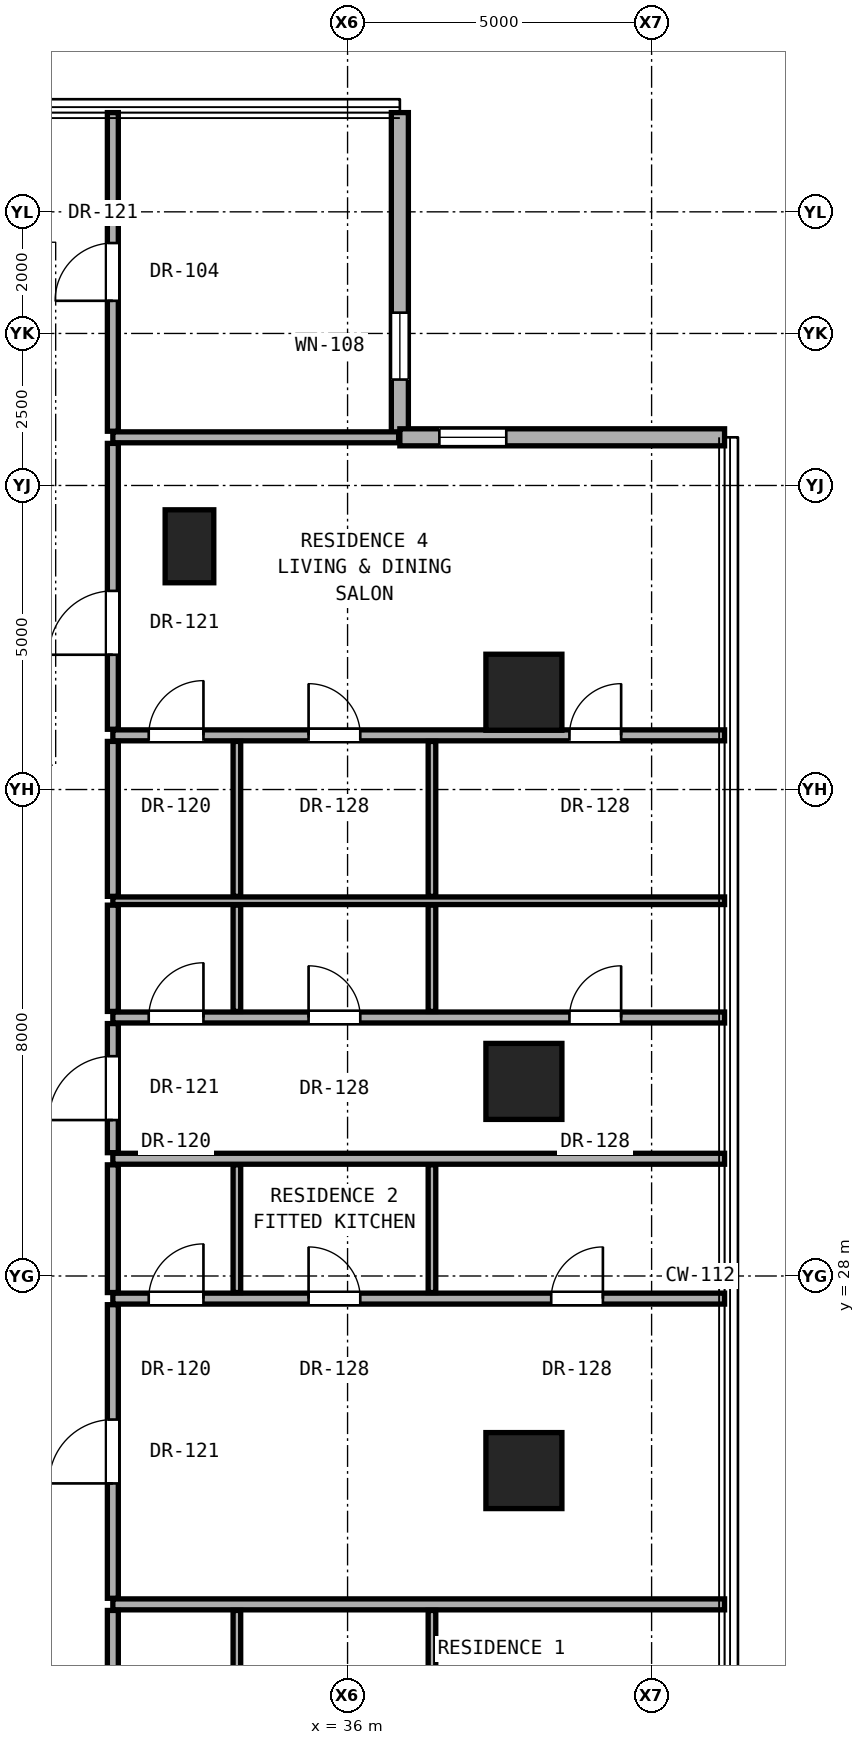
"""IFC4 building model, lengths in metres.
Left out: names, types, materials, properties, quantities, classifications, styles, units other than length and angle.
Written with IfcOpenShell. Run it as: python <this file> out.ifc"""

import sys

from ifc_helpers import new_model, si_unit, direction, frame, frame_2d, origin, origin_2d, place, context, subcontext, project, spatial, rectangle, hollow_rectangle, extrude, element, fill, save


model = new_model("IFC4")
c1 = context("Model", 3, precision=1e-05, world=origin(), true_north=direction((0.0, 1.0)))
c2 = subcontext(c1, "Body", "Model", "MODEL_VIEW")
j1 = project(units=[si_unit("LENGTHUNIT", "METRE"), si_unit("PLANEANGLEUNIT", "RADIAN")], contexts=[c1])
p1 = place(None, origin())
s1 = spatial("IfcSite", under=j1, at=p1, CompositionType="ELEMENT")
p2 = place(p1, origin())
s2 = spatial("IfcBuilding", under=s1, at=p2, CompositionType="ELEMENT")
p3 = place(p2, frame((0.0, 0.0, 65.3)))
s3 = spatial("IfcBuildingStorey", under=s2, at=p3, CompositionType="ELEMENT", Elevation=65.3)
for number, where, z_axis, x_axis in (
    (1, (38.9, 24.8, 0.0), (0.0, 0.0, 1.0), (1.0, 0.0, 0.0)),
    (2, (38.9, 31.2, 0.0), (0.0, 0.0, 1.0), (1.0, 0.0, 0.0)),
    (3, (38.9, 37.6, 0.0), (0.0, 0.0, 1.0), (1.0, 0.0, 0.0)),
):
    element("IfcColumn", number, at=place(p3, frame(where, z_axis=z_axis, x_axis=x_axis)), inside=s3, PredefinedType="COLUMN", context=c2, shape_type="SweptSolid", body=[
        extrude(hollow_rectangle(XDim=1.25, YDim=1.25, WallThickness=0.07, at=origin_2d()), origin(), (0.0, 0.0, 1.0), 3.3),
    ])
p4 = place(p3, frame((33.4, 40.0, 0.0), z_axis=(0.0, 0.0, 1.0), x_axis=(1.0, 0.0, 0.0)))
e4 = element("IfcColumn", 4, at=p4, inside=s3, PredefinedType="PILASTER", context=c2, shape_type="SweptSolid", body=[
    extrude(rectangle(XDim=0.8, YDim=1.2, at=origin_2d()), origin(), (0.0, 0.0, 1.0), 3.3),
])
p5 = place(p3, frame((36.86, 41.792, 0.0), z_axis=(0.0, 0.0, 1.0), x_axis=(0.0, 1.0, 0.0)))
e5 = element("IfcWall", 5, at=p5, inside=s3, PredefinedType="SOLIDWALL", context=c2, shape_type="SweptSolid", body=[
    extrude(rectangle(XDim=5.34, YDim=0.28, at=frame_2d((2.67, 0.0))), origin(), (0.0, 0.0, 1.0), 3.04),
])
p6 = place(p5, frame((0.95, 0.0, 0.85)))
e6 = element("IfcOpeningElement", 6, at=p6, cuts=e5, PredefinedType="OPENING", context=c2, shape_type="SweptSolid", body=[
    extrude(rectangle(XDim=1.1, YDim=2.0, at=frame_2d((0.55, 1.0))), frame((0.0, 0.15, 0.0), z_axis=(0.0, -1.0, 0.0), x_axis=(1.0, 0.0, 0.0)), (0.0, 0.0, 1.0), 0.3),
])
p7 = place(p3, frame((42.2, 41.792, 0.0), z_axis=(0.0, 0.0, 1.0), x_axis=(-1.0, 0.0, 0.0)))
e7 = element("IfcWall", 7, at=p7, inside=s3, PredefinedType="SOLIDWALL", context=c2, shape_type="SweptSolid", body=[
    extrude(rectangle(XDim=5.34, YDim=0.28, at=frame_2d((2.67, 0.0))), origin(), (0.0, 0.0, 1.0), 3.04),
])
p8 = place(p7, frame((3.59, 0.0, 0.85)))
e8 = element("IfcOpeningElement", 8, at=p8, cuts=e7, PredefinedType="OPENING", context=c2, shape_type="SweptSolid", body=[
    extrude(rectangle(XDim=1.1, YDim=2.0, at=frame_2d((0.55, 1.0))), frame((0.0, 0.15, 0.0), z_axis=(0.0, -1.0, 0.0), x_axis=(1.0, 0.0, 0.0)), (0.0, 0.0, 1.0), 0.3),
])
p9 = place(p3, frame((32.14, 22.6, 0.0), z_axis=(0.0, 0.0, 1.0), x_axis=(1.0, 0.0, 0.0)))
e9 = element("IfcWall", 9, at=p9, inside=s3, PredefinedType="PARTITIONING", context=c2, shape_type="SweptSolid", body=[
    extrude(rectangle(XDim=10.06, YDim=0.18, at=frame_2d((5.03, 0.0))), origin(), (0.0, 0.0, 1.0), 2.125),
])
p10 = place(p3, frame((32.14, 27.628, 0.0), z_axis=(0.0, 0.0, 1.0), x_axis=(1.0, 0.0, 0.0)))
e10 = element("IfcWall", 10, at=p10, inside=s3, PredefinedType="PARTITIONING", context=c2, shape_type="SweptSolid", body=[
    extrude(rectangle(XDim=10.06, YDim=0.18, at=frame_2d((5.03, 0.0))), origin(), (0.0, 0.0, 1.0), 2.125),
])
p11 = place(p10, frame((7.209, 0.0, 0.0)))
e11 = element("IfcOpeningElement", 11, at=p11, cuts=e10, PredefinedType="OPENING", context=c2, shape_type="SweptSolid", body=[
    extrude(rectangle(XDim=0.85, YDim=2.01, at=frame_2d((0.425, 1.005))), frame((0.0, 0.1, 0.0), z_axis=(0.0, -1.0, 0.0), x_axis=(1.0, 0.0, 0.0)), (0.0, 0.0, 1.0), 0.2),
])
p12 = place(p10, frame((3.219, 0.0, 0.0)))
e12 = element("IfcOpeningElement", 12, at=p12, cuts=e10, PredefinedType="OPENING", context=c2, shape_type="SweptSolid", body=[
    extrude(rectangle(XDim=0.85, YDim=2.01, at=frame_2d((0.425, 1.005))), frame((0.0, 0.1, 0.0), z_axis=(0.0, -1.0, 0.0), x_axis=(1.0, 0.0, 0.0)), (0.0, 0.0, 1.0), 0.2),
])
p13 = place(p10, frame((0.59, 0.0, 0.0)))
e13 = element("IfcOpeningElement", 13, at=p13, cuts=e10, PredefinedType="OPENING", context=c2, shape_type="SweptSolid", body=[
    extrude(rectangle(XDim=0.9, YDim=2.1, at=frame_2d((0.45, 1.05))), frame((0.0, 0.1, 0.0), z_axis=(0.0, -1.0, 0.0), x_axis=(1.0, 0.0, 0.0)), (0.0, 0.0, 1.0), 0.2),
])
p14 = place(p3, frame((32.14, 29.928, 0.0), z_axis=(0.0, 0.0, 1.0), x_axis=(1.0, 0.0, 0.0)))
e14 = element("IfcWall", 14, at=p14, inside=s3, PredefinedType="PARTITIONING", context=c2, shape_type="SweptSolid", body=[
    extrude(rectangle(XDim=10.06, YDim=0.18, at=frame_2d((5.03, 0.0))), origin(), (0.0, 0.0, 1.0), 2.125),
])
p15 = place(p3, frame((32.14, 32.251, 0.0), z_axis=(0.0, 0.0, 1.0), x_axis=(1.0, 0.0, 0.0)))
e15 = element("IfcWall", 15, at=p15, inside=s3, PredefinedType="PARTITIONING", context=c2, shape_type="SweptSolid", body=[
    extrude(rectangle(XDim=10.06, YDim=0.18, at=frame_2d((5.03, 0.0))), origin(), (0.0, 0.0, 1.0), 2.125),
])
p16 = place(p15, frame((7.509, 0.0, 0.0)))
e16 = element("IfcOpeningElement", 16, at=p16, cuts=e15, PredefinedType="OPENING", context=c2, shape_type="SweptSolid", body=[
    extrude(rectangle(XDim=0.85, YDim=2.01, at=frame_2d((0.425, 1.005))), frame((0.0, 0.1, 0.0), z_axis=(0.0, -1.0, 0.0), x_axis=(1.0, 0.0, 0.0)), (0.0, 0.0, 1.0), 0.2),
])
p17 = place(p15, frame((3.219, 0.0, 0.0)))
e17 = element("IfcOpeningElement", 17, at=p17, cuts=e15, PredefinedType="OPENING", context=c2, shape_type="SweptSolid", body=[
    extrude(rectangle(XDim=0.85, YDim=2.01, at=frame_2d((0.425, 1.005))), frame((0.0, 0.1, 0.0), z_axis=(0.0, -1.0, 0.0), x_axis=(1.0, 0.0, 0.0)), (0.0, 0.0, 1.0), 0.2),
])
p18 = place(p15, frame((0.59, 0.0, 0.0)))
e18 = element("IfcOpeningElement", 18, at=p18, cuts=e15, PredefinedType="OPENING", context=c2, shape_type="SweptSolid", body=[
    extrude(rectangle(XDim=0.9, YDim=2.1, at=frame_2d((0.45, 1.05))), frame((0.0, 0.1, 0.0), z_axis=(0.0, -1.0, 0.0), x_axis=(1.0, 0.0, 0.0)), (0.0, 0.0, 1.0), 0.2),
])
p19 = place(p3, frame((32.14, 34.171, 0.0), z_axis=(0.0, 0.0, 1.0), x_axis=(1.0, 0.0, 0.0)))
e19 = element("IfcWall", 19, at=p19, inside=s3, PredefinedType="PARTITIONING", context=c2, shape_type="SweptSolid", body=[
    extrude(rectangle(XDim=10.06, YDim=0.125, at=frame_2d((5.03, 0.0))), origin(), (0.0, 0.0, 1.0), 2.125),
])
p20 = place(p3, frame((32.14, 36.891, 0.0), z_axis=(0.0, 0.0, 1.0), x_axis=(1.0, 0.0, 0.0)))
e20 = element("IfcWall", 20, at=p20, inside=s3, PredefinedType="PARTITIONING", context=c2, shape_type="SweptSolid", body=[
    extrude(rectangle(XDim=10.06, YDim=0.18, at=frame_2d((5.03, 0.0))), origin(), (0.0, 0.0, 1.0), 2.125),
])
p21 = place(p20, frame((7.509, 0.0, 0.0)))
e21 = element("IfcOpeningElement", 21, at=p21, cuts=e20, PredefinedType="OPENING", context=c2, shape_type="SweptSolid", body=[
    extrude(rectangle(XDim=0.85, YDim=2.01, at=frame_2d((0.425, 1.005))), frame((0.0, 0.1, 0.0), z_axis=(0.0, -1.0, 0.0), x_axis=(1.0, 0.0, 0.0)), (0.0, 0.0, 1.0), 0.2),
])
p22 = place(p20, frame((3.219, 0.0, 0.0)))
e22 = element("IfcOpeningElement", 22, at=p22, cuts=e20, PredefinedType="OPENING", context=c2, shape_type="SweptSolid", body=[
    extrude(rectangle(XDim=0.85, YDim=2.01, at=frame_2d((0.425, 1.005))), frame((0.0, 0.1, 0.0), z_axis=(0.0, -1.0, 0.0), x_axis=(1.0, 0.0, 0.0)), (0.0, 0.0, 1.0), 0.2),
])
p23 = place(p20, frame((0.59, 0.0, 0.0)))
e23 = element("IfcOpeningElement", 23, at=p23, cuts=e20, PredefinedType="OPENING", context=c2, shape_type="SweptSolid", body=[
    extrude(rectangle(XDim=0.9, YDim=2.1, at=frame_2d((0.45, 1.05))), frame((0.0, 0.1, 0.0), z_axis=(0.0, -1.0, 0.0), x_axis=(1.0, 0.0, 0.0)), (0.0, 0.0, 1.0), 0.2),
])
p24 = place(p3, frame((32.14, 41.792, 0.0), z_axis=(0.0, 0.0, 1.0), x_axis=(1.0, 0.0, 0.0)))
e24 = element("IfcWall", 24, at=p24, inside=s3, PredefinedType="PARTITIONING", context=c2, shape_type="SweptSolid", body=[
    extrude(rectangle(XDim=4.7, YDim=0.18, at=frame_2d((2.35, 0.0))), origin(), (0.0, 0.0, 1.0), 3.06),
])
p25 = place(p3, frame((32.14, 19.98, 0.0), z_axis=(0.0, 0.0, 1.0), x_axis=(0.0, 1.0, 0.0)))
e25 = element("IfcWall", 25, at=p25, inside=s3, PredefinedType="PARTITIONING", context=c2, shape_type="SweptSolid", body=[
    extrude(rectangle(XDim=2.52, YDim=0.18, at=frame_2d((1.26, 0.0))), origin(), (0.0, 0.0, 1.0), 3.06),
])
p26 = place(p3, frame((32.14, 22.7, 0.0), z_axis=(0.0, 0.0, 1.0), x_axis=(0.0, 1.0, 0.0)))
e26 = element("IfcWall", 26, at=p26, inside=s3, PredefinedType="PARTITIONING", context=c2, shape_type="SweptSolid", body=[
    extrude(rectangle(XDim=4.828, YDim=0.18, at=frame_2d((2.414, 0.0))), origin(), (0.0, 0.0, 1.0), 2.279),
])
p27 = place(p26, frame((1.889, 0.0, 0.0)))
e27 = element("IfcOpeningElement", 27, at=p27, cuts=e26, PredefinedType="OPENING", context=c2, shape_type="SweptSolid", body=[
    extrude(rectangle(XDim=1.05, YDim=2.2, at=frame_2d((0.525, 1.1))), frame((0.0, 0.1, 0.0), z_axis=(0.0, -1.0, 0.0), x_axis=(1.0, 0.0, 0.0)), (0.0, 0.0, 1.0), 0.2),
])
p28 = place(p3, frame((32.14, 27.728, 0.0), z_axis=(0.0, 0.0, 1.0), x_axis=(0.0, 1.0, 0.0)))
e28 = element("IfcWall", 28, at=p28, inside=s3, PredefinedType="PARTITIONING", context=c2, shape_type="SweptSolid", body=[
    extrude(rectangle(XDim=2.1, YDim=0.18, at=frame_2d((1.05, 0.0))), origin(), (0.0, 0.0, 1.0), 3.06),
])
p29 = place(p3, frame((32.14, 30.028, 0.0), z_axis=(0.0, 0.0, 1.0), x_axis=(0.0, 1.0, 0.0)))
e29 = element("IfcWall", 29, at=p29, inside=s3, PredefinedType="PARTITIONING", context=c2, shape_type="SweptSolid", body=[
    extrude(rectangle(XDim=2.123, YDim=0.18, at=frame_2d((1.062, 0.0))), origin(), (0.0, 0.0, 1.0), 2.279),
])
p30 = place(p29, frame((0.537, 0.0, 0.0)))
e30 = element("IfcOpeningElement", 30, at=p30, cuts=e29, PredefinedType="OPENING", context=c2, shape_type="SweptSolid", body=[
    extrude(rectangle(XDim=1.05, YDim=2.2, at=frame_2d((0.525, 1.1))), frame((0.0, 0.1, 0.0), z_axis=(0.0, -1.0, 0.0), x_axis=(1.0, 0.0, 0.0)), (0.0, 0.0, 1.0), 0.2),
])
p31 = place(p3, frame((32.14, 32.351, 0.0), z_axis=(0.0, 0.0, 1.0), x_axis=(0.0, 1.0, 0.0)))
e31 = element("IfcWall", 31, at=p31, inside=s3, PredefinedType="PARTITIONING", context=c2, shape_type="SweptSolid", body=[
    extrude(rectangle(XDim=1.747, YDim=0.18, at=frame_2d((0.874, 0.0))), origin(), (0.0, 0.0, 1.0), 3.06),
])
p32 = place(p3, frame((32.14, 34.243, 0.0), z_axis=(0.0, 0.0, 1.0), x_axis=(0.0, 1.0, 0.0)))
e32 = element("IfcWall", 32, at=p32, inside=s3, PredefinedType="PARTITIONING", context=c2, shape_type="SweptSolid", body=[
    extrude(rectangle(XDim=2.548, YDim=0.18, at=frame_2d((1.274, 0.0))), origin(), (0.0, 0.0, 1.0), 3.06),
])
p33 = place(p3, frame((32.14, 36.991, 0.0), z_axis=(0.0, 0.0, 1.0), x_axis=(0.0, 1.0, 0.0)))
e33 = element("IfcWall", 33, at=p33, inside=s3, PredefinedType="PARTITIONING", context=c2, shape_type="SweptSolid", body=[
    extrude(rectangle(XDim=4.701, YDim=0.18, at=frame_2d((2.351, 0.0))), origin(), (0.0, 0.0, 1.0), 2.436),
])
p34 = place(p33, frame((1.226, 0.0, 0.0)))
e34 = element("IfcOpeningElement", 34, at=p34, cuts=e33, PredefinedType="OPENING", context=c2, shape_type="SweptSolid", body=[
    extrude(rectangle(XDim=1.05, YDim=2.2, at=frame_2d((0.525, 1.1))), frame((0.0, 0.1, 0.0), z_axis=(0.0, -1.0, 0.0), x_axis=(1.0, 0.0, 0.0)), (0.0, 0.0, 1.0), 0.2),
])
p35 = place(p3, frame((32.14, 41.892, 0.0), z_axis=(0.0, 0.0, 1.0), x_axis=(0.0, 1.0, 0.0)))
e35 = element("IfcWall", 35, at=p35, inside=s3, PredefinedType="PARTITIONING", context=c2, shape_type="SweptSolid", body=[
    extrude(rectangle(XDim=5.24, YDim=0.18, at=frame_2d((2.62, 0.0))), origin(), (0.0, 0.0, 1.0), 3.06),
])
p36 = place(p35, frame((2.145, 0.0, 0.0)))
e36 = element("IfcOpeningElement", 36, at=p36, cuts=e35, PredefinedType="OPENING", context=c2, shape_type="SweptSolid", body=[
    extrude(rectangle(XDim=0.95, YDim=2.15, at=frame_2d((0.475, 1.075))), frame((0.0, 0.1, 0.0), z_axis=(0.0, -1.0, 0.0), x_axis=(1.0, 0.0, 0.0)), (0.0, 0.0, 1.0), 0.2),
])
p37 = place(p3, frame((34.18, 19.98, 0.0), z_axis=(0.0, 0.0, 1.0), x_axis=(0.0, 1.0, 0.0)))
e37 = element("IfcWall", 37, at=p37, inside=s3, PredefinedType="PARTITIONING", context=c2, shape_type="SweptSolid", body=[
    extrude(rectangle(XDim=2.52, YDim=0.125, at=frame_2d((1.26, 0.0))), origin(), (0.0, 0.0, 1.0), 3.06),
])
p38 = place(p3, frame((34.18, 27.728, 0.0), z_axis=(0.0, 0.0, 1.0), x_axis=(0.0, 1.0, 0.0)))
e38 = element("IfcWall", 38, at=p38, inside=s3, PredefinedType="PARTITIONING", context=c2, shape_type="SweptSolid", body=[
    extrude(rectangle(XDim=2.1, YDim=0.125, at=frame_2d((1.05, 0.0))), origin(), (0.0, 0.0, 1.0), 3.06),
])
p39 = place(p3, frame((34.18, 32.351, 0.0), z_axis=(0.0, 0.0, 1.0), x_axis=(0.0, 1.0, 0.0)))
e39 = element("IfcWall", 39, at=p39, inside=s3, PredefinedType="PARTITIONING", context=c2, shape_type="SweptSolid", body=[
    extrude(rectangle(XDim=1.747, YDim=0.125, at=frame_2d((0.874, 0.0))), origin(), (0.0, 0.0, 1.0), 3.06),
])
p40 = place(p3, frame((34.18, 34.243, 0.0), z_axis=(0.0, 0.0, 1.0), x_axis=(0.0, 1.0, 0.0)))
e40 = element("IfcWall", 40, at=p40, inside=s3, PredefinedType="PARTITIONING", context=c2, shape_type="SweptSolid", body=[
    extrude(rectangle(XDim=2.548, YDim=0.125, at=frame_2d((1.274, 0.0))), origin(), (0.0, 0.0, 1.0), 3.06),
])
p41 = place(p3, frame((37.388, 19.98, 0.0), z_axis=(0.0, 0.0, 1.0), x_axis=(0.0, 1.0, 0.0)))
e41 = element("IfcWall", 41, at=p41, inside=s3, PredefinedType="PARTITIONING", context=c2, shape_type="SweptSolid", body=[
    extrude(rectangle(XDim=2.52, YDim=0.125, at=frame_2d((1.26, 0.0))), origin(), (0.0, 0.0, 1.0), 3.06),
])
p42 = place(p3, frame((37.388, 27.728, 0.0), z_axis=(0.0, 0.0, 1.0), x_axis=(0.0, 1.0, 0.0)))
e42 = element("IfcWall", 42, at=p42, inside=s3, PredefinedType="PARTITIONING", context=c2, shape_type="SweptSolid", body=[
    extrude(rectangle(XDim=2.1, YDim=0.125, at=frame_2d((1.05, 0.0))), origin(), (0.0, 0.0, 1.0), 3.06),
])
p43 = place(p3, frame((37.388, 32.351, 0.0), z_axis=(0.0, 0.0, 1.0), x_axis=(0.0, 1.0, 0.0)))
e43 = element("IfcWall", 43, at=p43, inside=s3, PredefinedType="PARTITIONING", context=c2, shape_type="SweptSolid", body=[
    extrude(rectangle(XDim=1.747, YDim=0.125, at=frame_2d((0.874, 0.0))), origin(), (0.0, 0.0, 1.0), 3.06),
])
p44 = place(p3, frame((37.388, 34.243, 0.0), z_axis=(0.0, 0.0, 1.0), x_axis=(0.0, 1.0, 0.0)))
e44 = element("IfcWall", 44, at=p44, inside=s3, PredefinedType="PARTITIONING", context=c2, shape_type="SweptSolid", body=[
    extrude(rectangle(XDim=2.548, YDim=0.125, at=frame_2d((1.274, 0.0))), origin(), (0.0, 0.0, 1.0), 3.06),
])
p45 = place(p6, origin())
e45 = element("IfcWindow", 45, at=p45, inside=s3, PartitioningType="SINGLE_PANEL", PredefinedType="WINDOW", context=c2, shape_type="SweptSolid", body=[
    extrude(rectangle(XDim=1.1, YDim=2.0, at=frame_2d((0.55, 1.0))), frame((0.0, 0.03, 0.0), z_axis=(0.0, -1.0, 0.0), x_axis=(1.0, 0.0, 0.0)), (0.0, 0.0, 1.0), 0.06),
])
fill(e6, e45)
p46 = place(p8, origin())
e46 = element("IfcWindow", 46, at=p46, inside=s3, PartitioningType="SINGLE_PANEL", PredefinedType="WINDOW", context=c2, shape_type="SweptSolid", body=[
    extrude(rectangle(XDim=1.1, YDim=2.0, at=frame_2d((0.55, 1.0))), frame((0.0, 0.03, 0.0), z_axis=(0.0, -1.0, 0.0), x_axis=(1.0, 0.0, 0.0)), (0.0, 0.0, 1.0), 0.06),
])
fill(e8, e46)
p47 = place(p27, origin())
e47 = element("IfcDoor", 47, at=p47, inside=s3, OperationType="SINGLE_SWING_LEFT", PredefinedType="DOOR", context=c2, shape_type="SweptSolid", body=[
    extrude(rectangle(XDim=1.05, YDim=2.2, at=frame_2d((0.525, 1.1))), frame((0.0, 0.025, 0.0), z_axis=(0.0, -1.0, 0.0), x_axis=(1.0, 0.0, 0.0)), (0.0, 0.0, 1.0), 0.05),
])
fill(e27, e47)
p48 = place(p11, origin())
e48 = element("IfcDoor", 48, at=p48, inside=s3, OperationType="SINGLE_SWING_RIGHT", PredefinedType="DOOR", context=c2, shape_type="SweptSolid", body=[
    extrude(rectangle(XDim=0.85, YDim=2.01, at=frame_2d((0.425, 1.005))), frame((0.0, 0.025, 0.0), z_axis=(0.0, -1.0, 0.0), x_axis=(1.0, 0.0, 0.0)), (0.0, 0.0, 1.0), 0.05),
])
fill(e11, e48)
p49 = place(p12, origin())
e49 = element("IfcDoor", 49, at=p49, inside=s3, OperationType="SINGLE_SWING_LEFT", PredefinedType="DOOR", context=c2, shape_type="SweptSolid", body=[
    extrude(rectangle(XDim=0.85, YDim=2.01, at=frame_2d((0.425, 1.005))), frame((0.0, 0.025, 0.0), z_axis=(0.0, -1.0, 0.0), x_axis=(1.0, 0.0, 0.0)), (0.0, 0.0, 1.0), 0.05),
])
fill(e12, e49)
p50 = place(p13, origin())
e50 = element("IfcDoor", 50, at=p50, inside=s3, OperationType="SINGLE_SWING_RIGHT", PredefinedType="DOOR", context=c2, shape_type="SweptSolid", body=[
    extrude(rectangle(XDim=0.9, YDim=2.1, at=frame_2d((0.45, 1.05))), frame((0.0, 0.025, 0.0), z_axis=(0.0, -1.0, 0.0), x_axis=(1.0, 0.0, 0.0)), (0.0, 0.0, 1.0), 0.05),
])
fill(e13, e50)
p51 = place(p30, origin())
e51 = element("IfcDoor", 51, at=p51, inside=s3, OperationType="SINGLE_SWING_LEFT", PredefinedType="DOOR", context=c2, shape_type="SweptSolid", body=[
    extrude(rectangle(XDim=1.05, YDim=2.2, at=frame_2d((0.525, 1.1))), frame((0.0, 0.025, 0.0), z_axis=(0.0, -1.0, 0.0), x_axis=(1.0, 0.0, 0.0)), (0.0, 0.0, 1.0), 0.05),
])
fill(e30, e51)
p52 = place(p16, origin())
e52 = element("IfcDoor", 52, at=p52, inside=s3, OperationType="SINGLE_SWING_RIGHT", PredefinedType="DOOR", context=c2, shape_type="SweptSolid", body=[
    extrude(rectangle(XDim=0.85, YDim=2.01, at=frame_2d((0.425, 1.005))), frame((0.0, 0.025, 0.0), z_axis=(0.0, -1.0, 0.0), x_axis=(1.0, 0.0, 0.0)), (0.0, 0.0, 1.0), 0.05),
])
fill(e16, e52)
p53 = place(p17, origin())
e53 = element("IfcDoor", 53, at=p53, inside=s3, OperationType="SINGLE_SWING_LEFT", PredefinedType="DOOR", context=c2, shape_type="SweptSolid", body=[
    extrude(rectangle(XDim=0.85, YDim=2.01, at=frame_2d((0.425, 1.005))), frame((0.0, 0.025, 0.0), z_axis=(0.0, -1.0, 0.0), x_axis=(1.0, 0.0, 0.0)), (0.0, 0.0, 1.0), 0.05),
])
fill(e17, e53)
p54 = place(p18, origin())
e54 = element("IfcDoor", 54, at=p54, inside=s3, OperationType="SINGLE_SWING_RIGHT", PredefinedType="DOOR", context=c2, shape_type="SweptSolid", body=[
    extrude(rectangle(XDim=0.9, YDim=2.1, at=frame_2d((0.45, 1.05))), frame((0.0, 0.025, 0.0), z_axis=(0.0, -1.0, 0.0), x_axis=(1.0, 0.0, 0.0)), (0.0, 0.0, 1.0), 0.05),
])
fill(e18, e54)
p55 = place(p34, origin())
e55 = element("IfcDoor", 55, at=p55, inside=s3, OperationType="SINGLE_SWING_LEFT", PredefinedType="DOOR", context=c2, shape_type="SweptSolid", body=[
    extrude(rectangle(XDim=1.05, YDim=2.2, at=frame_2d((0.525, 1.1))), frame((0.0, 0.025, 0.0), z_axis=(0.0, -1.0, 0.0), x_axis=(1.0, 0.0, 0.0)), (0.0, 0.0, 1.0), 0.05),
])
fill(e34, e55)
p56 = place(p21, origin())
e56 = element("IfcDoor", 56, at=p56, inside=s3, OperationType="SINGLE_SWING_RIGHT", PredefinedType="DOOR", context=c2, shape_type="SweptSolid", body=[
    extrude(rectangle(XDim=0.85, YDim=2.01, at=frame_2d((0.425, 1.005))), frame((0.0, 0.025, 0.0), z_axis=(0.0, -1.0, 0.0), x_axis=(1.0, 0.0, 0.0)), (0.0, 0.0, 1.0), 0.05),
])
fill(e21, e56)
p57 = place(p22, origin())
e57 = element("IfcDoor", 57, at=p57, inside=s3, OperationType="SINGLE_SWING_LEFT", PredefinedType="DOOR", context=c2, shape_type="SweptSolid", body=[
    extrude(rectangle(XDim=0.85, YDim=2.01, at=frame_2d((0.425, 1.005))), frame((0.0, 0.025, 0.0), z_axis=(0.0, -1.0, 0.0), x_axis=(1.0, 0.0, 0.0)), (0.0, 0.0, 1.0), 0.05),
])
fill(e22, e57)
p58 = place(p23, origin())
e58 = element("IfcDoor", 58, at=p58, inside=s3, OperationType="SINGLE_SWING_RIGHT", PredefinedType="DOOR", context=c2, shape_type="SweptSolid", body=[
    extrude(rectangle(XDim=0.9, YDim=2.1, at=frame_2d((0.45, 1.05))), frame((0.0, 0.025, 0.0), z_axis=(0.0, -1.0, 0.0), x_axis=(1.0, 0.0, 0.0)), (0.0, 0.0, 1.0), 0.05),
])
fill(e23, e58)
p59 = place(p36, origin())
e59 = element("IfcDoor", 59, at=p59, inside=s3, OperationType="SINGLE_SWING_LEFT", PredefinedType="DOOR", context=c2, shape_type="SweptSolid", body=[
    extrude(rectangle(XDim=0.95, YDim=2.15, at=frame_2d((0.475, 1.075))), frame((0.0, 0.025, 0.0), z_axis=(0.0, -1.0, 0.0), x_axis=(1.0, 0.0, 0.0)), (0.0, 0.0, 1.0), 0.05),
])
fill(e36, e59)
save(model, sys.argv[1])
